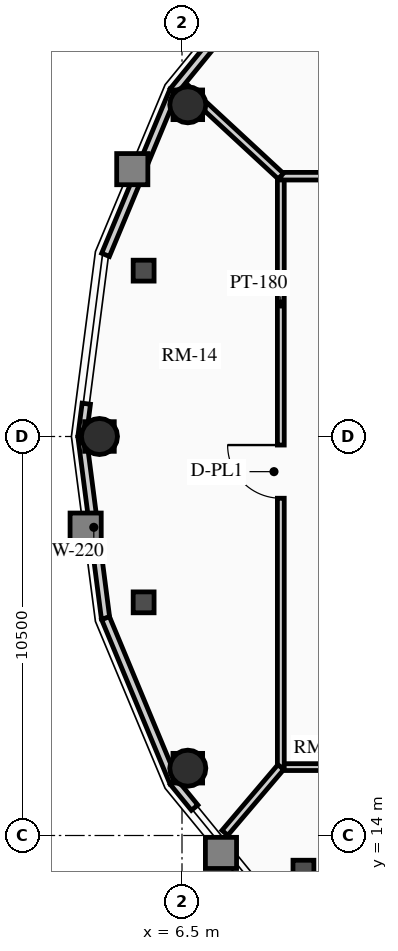
"""IFC4 building model, lengths in metres.
Left out: names, types, materials, properties, quantities, classifications, styles, units other than length and angle.
Written with IfcOpenShell. Run it as: python <this file> out.ifc"""

import sys

from ifc_helpers import new_model, si_unit, direction, frame, frame_2d, origin, origin_2d, place, context, subcontext, project, spatial, rectangle, circle, extrude, source, transform, mapped, element, fill, save


model = new_model("IFC4")
c1 = context("Model", 3, precision=1e-05, world=origin(), true_north=direction((0.0, 1.0)))
c2 = subcontext(c1, "Body", "Model", "MODEL_VIEW")
j1 = project(units=[si_unit("LENGTHUNIT", "METRE"), si_unit("PLANEANGLEUNIT", "RADIAN")], contexts=[c1])
p1 = place(None, origin())
s1 = spatial("IfcSite", under=j1, at=p1, CompositionType="ELEMENT")
p2 = place(p1, origin())
s2 = spatial("IfcBuilding", under=s1, at=p2, CompositionType="ELEMENT")
p3 = place(p2, frame((0.0, 0.0, 235.65)))
s3 = spatial("IfcBuildingStorey", under=s2, at=p3, CompositionType="ELEMENT", Elevation=235.65)
for number, where, z_axis, x_axis in (
    (1, (6.653, 33.229, 0.0), (0.0, 0.0, 1.0), (1.0, 0.0, 0.0)),
    (2, (4.328, 24.5, 0.0), (0.0, 0.0, 1.0), (1.0, 0.0, 0.0)),
    (3, (6.653, 15.771, 0.0), (0.0, 0.0, 1.0), (1.0, 0.0, 0.0)),
):
    element("IfcColumn", number, at=place(p3, frame(where, z_axis=z_axis, x_axis=x_axis)), inside=s3, PredefinedType="COLUMN", context=c2, shape_type="SweptSolid", body=[
        extrude(circle(Radius=0.475, at=origin_2d()), origin(), (0.0, 0.0, 1.0), 4.68),
    ])
p4 = place(p3, frame((6.282, 33.593, 0.0), z_axis=(0.0, 0.0, 1.0), x_axis=(0.632467166636, 0.774587169483, 0.0)))
e4 = element("IfcWall", 4, at=p4, inside=s3, PredefinedType="SOLIDWALL", context=c2, shape_type="SweptSolid", body=[
    extrude(rectangle(XDim=4.418, YDim=0.22, at=frame_2d((2.209, 0.0))), origin(), (0.0, 0.0, 1.0), 3.696),
])
p5 = place(p3, frame((4.488, 29.281, 0.0), z_axis=(0.0, 0.0, 1.0), x_axis=(0.384036305194, 0.923317993052, 0.0)))
e5 = element("IfcWall", 5, at=p5, inside=s3, PredefinedType="SOLIDWALL", context=c2, shape_type="SweptSolid", body=[
    extrude(rectangle(XDim=4.671, YDim=0.22, at=frame_2d((2.335, 0.0))), origin(), (0.0, 0.0, 1.0), 3.696),
])
p6 = place(p3, frame((3.87, 24.5, 0.0), z_axis=(0.0, 0.0, 1.0), x_axis=(0.128247365719, 0.991742211054, 0.0)))
e6 = element("IfcWall", 6, at=p6, inside=s3, PredefinedType="SOLIDWALL", context=c2, shape_type="SweptSolid", body=[
    extrude(rectangle(XDim=0.87, YDim=0.22, at=frame_2d((0.435, 0.0))), origin(), (0.0, 0.0, 1.0), 3.696),
])
p7 = place(p3, frame((4.488, 19.719, 0.0), z_axis=(0.0, 0.0, 1.0), x_axis=(-0.128241318541, 0.991742993027, 0.0)))
e7 = element("IfcWall", 7, at=p7, inside=s3, PredefinedType="SOLIDWALL", context=c2, shape_type="SweptSolid", body=[
    extrude(rectangle(XDim=4.82, YDim=0.22, at=frame_2d((2.41, 0.0))), origin(), (0.0, 0.0, 1.0), 3.696),
])
p8 = place(p3, frame((6.282, 15.407, 0.0), z_axis=(0.0, 0.0, 1.0), x_axis=(-0.384036305194, 0.923317993052, 0.0)))
e8 = element("IfcWall", 8, at=p8, inside=s3, PredefinedType="SOLIDWALL", context=c2, shape_type="SweptSolid", body=[
    extrude(rectangle(XDim=4.671, YDim=0.22, at=frame_2d((2.335, 0.0))), origin(), (0.0, 0.0, 1.0), 3.696),
])
p9 = place(p3, frame((6.832, 14.733, 0.0), z_axis=(0.0, 0.0, 1.0), x_axis=(-0.632534570862, 0.774532127587, 0.0)))
e9 = element("IfcWall", 9, at=p9, inside=s3, PredefinedType="SOLIDWALL", context=c2, shape_type="SweptSolid", body=[
    extrude(rectangle(XDim=0.87, YDim=0.22, at=frame_2d((0.435, 0.0))), origin(), (0.0, 0.0, 1.0), 3.696),
])
p10 = place(p3, frame((9.1, 15.8, 0.0), z_axis=(0.0, 0.0, 1.0), x_axis=(1.0, 0.0, 0.0)))
e10 = element("IfcWall", 10, at=p10, inside=s3, PredefinedType="PARTITIONING", context=c2, shape_type="SweptSolid", body=[
    extrude(rectangle(XDim=14.8, YDim=0.18, at=frame_2d((7.4, 0.0))), origin(), (0.0, 0.0, 1.0), 3.616),
])
m1 = source(origin(), c2, "Body", "SweptSolid", [
    extrude(rectangle(XDim=1.4, YDim=2.02, at=frame_2d((0.7, 1.01))), frame((0.0, 0.1, 0.0), z_axis=(0.0, -1.0, 0.0), x_axis=(1.0, 0.0, 0.0)), (0.0, 0.0, 1.0), 0.2),
])
p11 = place(p10, frame((6.7, 0.0, 0.0)))
e11 = element("IfcOpeningElement", 11, at=p11, cuts=e10, PredefinedType="OPENING", context=c2, shape_type="MappedRepresentation", body=[
    mapped(m1, transform((0.0, 0.0, 0.0), x_axis=(1.0, 0.0, 0.0), y_axis=(0.0, 1.0, 0.0), z_axis=(0.0, 0.0, 1.0), scale=1.0)),
])
p12 = place(p3, frame((9.1, 15.8, 0.0), z_axis=(0.0, 0.0, 1.0), x_axis=(0.0, 1.0, 0.0)))
e12 = element("IfcWall", 12, at=p12, inside=s3, PredefinedType="PARTITIONING", context=c2, shape_type="SweptSolid", body=[
    extrude(rectangle(XDim=15.55, YDim=0.18, at=frame_2d((7.775, 0.0))), origin(), (0.0, 0.0, 1.0), 3.616),
])
p13 = place(p12, frame((7.075, 0.0, 0.0)))
e13 = element("IfcOpeningElement", 13, at=p13, cuts=e12, PredefinedType="OPENING", context=c2, shape_type="MappedRepresentation", body=[
    mapped(m1, transform((0.0, 0.0, 0.0), x_axis=(1.0, 0.0, 0.0), y_axis=(0.0, 1.0, 0.0), z_axis=(0.0, 0.0, 1.0), scale=1.0)),
])
p14 = place(p3, frame((9.1, 31.35, 0.0), z_axis=(0.0, 0.0, 1.0), x_axis=(1.0, 0.0, 0.0)))
e14 = element("IfcWall", 14, at=p14, inside=s3, PredefinedType="PARTITIONING", context=c2, shape_type="SweptSolid", body=[
    extrude(rectangle(XDim=1.85, YDim=0.2, at=frame_2d((0.925, 0.0))), origin(), (0.0, 0.0, 1.0), 3.616),
])
p15 = place(p3, frame((9.1, 31.35, 0.0), z_axis=(0.0, 0.0, 1.0), x_axis=(-0.733869107154, 0.679290904963, 0.0)))
e15 = element("IfcWall", 15, at=p15, inside=s3, PredefinedType="PARTITIONING", context=c2, shape_type="SweptSolid", body=[
    extrude(rectangle(XDim=3.409, YDim=0.2, at=frame_2d((1.704, 0.0))), origin(), (0.0, 0.0, 1.0), 3.616),
])
p16 = place(p3, frame((9.1, 15.8, 0.0), z_axis=(0.0, 0.0, 1.0), x_axis=(-0.647910417059, -0.761716542729, 0.0)))
e16 = element("IfcWall", 16, at=p16, inside=s3, PredefinedType="PARTITIONING", context=c2, shape_type="SweptSolid", body=[
    extrude(rectangle(XDim=2.272, YDim=0.2, at=frame_2d((1.136, 0.0))), origin(), (0.0, 0.0, 1.0), 3.696),
])
m2 = source(origin(), c2, "Body", "SweptSolid", [
    extrude(rectangle(XDim=1.4, YDim=2.02, at=frame_2d((0.7, 1.01))), frame((0.0, 0.025, 0.0), z_axis=(0.0, -1.0, 0.0), x_axis=(1.0, 0.0, 0.0)), (0.0, 0.0, 1.0), 0.05),
])
p17 = place(p13, origin())
e17 = element("IfcDoor", 17, at=p17, inside=s3, OperationType="SINGLE_SWING_RIGHT", PredefinedType="DOOR", context=c2, shape_type="MappedRepresentation", body=[
    mapped(m2, transform((0.0, 0.0, 0.0), x_axis=(1.0, 0.0, 0.0), y_axis=(0.0, 1.0, 0.0), z_axis=(0.0, 0.0, 1.0), scale=1.0)),
])
fill(e13, e17)
save(model, sys.argv[1])
